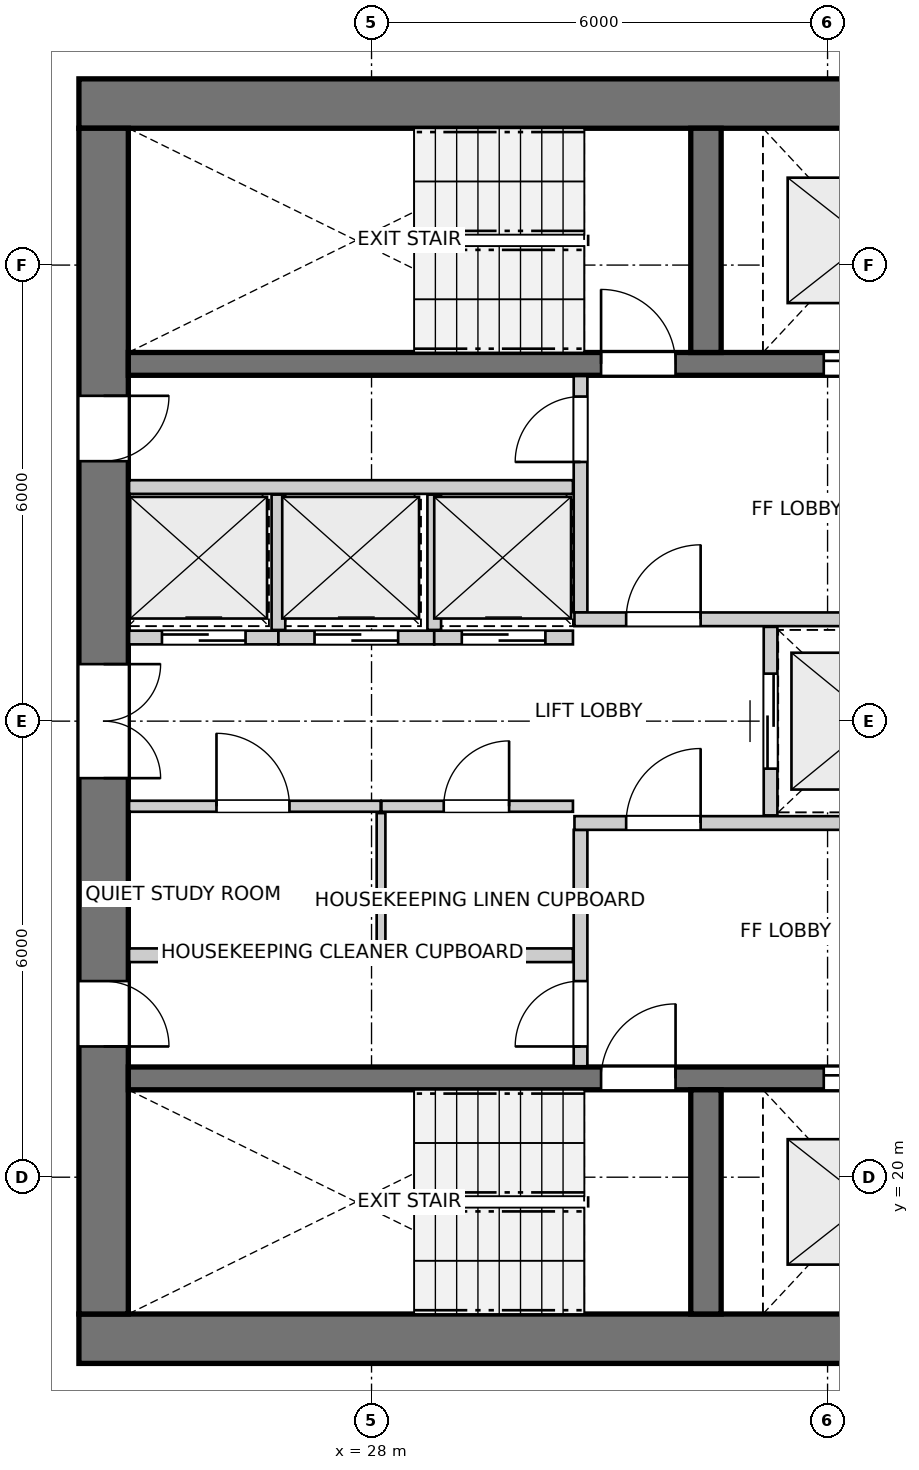
"""IFC4 building model, lengths in metres.
Left out: names, types, materials, properties, quantities, classifications, styles, units other than length and angle.
Written with IfcOpenShell. Run it as: python <this file> out.ifc"""

import sys

from ifc_helpers import new_model, si_unit, direction, frame, frame_2d, origin, place, context, subcontext, project, spatial, rectangle, extrude, source, transform, mapped, element, fill, save


model = new_model("IFC4")
c1 = context("Model", 3, precision=1e-05, world=origin(), true_north=direction((0.0, 1.0)))
c2 = subcontext(c1, "Body", "Model", "MODEL_VIEW")
j1 = project(units=[si_unit("LENGTHUNIT", "METRE"), si_unit("PLANEANGLEUNIT", "RADIAN")], contexts=[c1])
p1 = place(None, origin())
s1 = spatial("IfcSite", under=j1, at=p1, CompositionType="ELEMENT")
p2 = place(p1, origin())
s2 = spatial("IfcBuilding", under=s1, at=p2, CompositionType="ELEMENT")
p3 = place(p2, frame((0.0, 0.0, 161.8)))
s3 = spatial("IfcBuildingStorey", under=s2, at=p3, CompositionType="ELEMENT", Elevation=161.8)
for number, where, z_axis, x_axis in (
    (1, (24.15, 17.875, 0.0), (0.0, 0.0, 1.0), (1.0, 0.0, 0.0)),
    (2, (36.55, 34.125, 0.0), (0.0, 0.0, 1.0), (-1.0, 0.0, 0.0)),
):
    element("IfcWall", number, at=place(p3, frame(where, z_axis=z_axis, x_axis=x_axis)), inside=s3, PredefinedType="SHEAR", context=c2, shape_type="SweptSolid", body=[
        extrude(rectangle(XDim=12.4, YDim=0.65, at=frame_2d((6.2, 0.0))), origin(), (0.0, 0.0, 1.0), 2.95),
    ])
p4 = place(p3, frame((24.475, 33.8, 0.0), z_axis=(0.0, 0.0, 1.0), x_axis=(0.0, -1.0, 0.0)))
e3 = element("IfcWall", 3, at=p4, inside=s3, PredefinedType="SHEAR", context=c2, shape_type="SweptSolid", body=[
    extrude(rectangle(XDim=15.6, YDim=0.65, at=frame_2d((7.8, 0.0))), origin(), (0.0, 0.0, 1.0), 2.95),
])
p5 = place(p4, frame((7.05, 0.0, 0.0)))
e4 = element("IfcOpeningElement", 4, at=p5, cuts=e3, PredefinedType="OPENING", context=c2, shape_type="SweptSolid", body=[
    extrude(rectangle(XDim=1.5, YDim=2.15, at=frame_2d((0.75, 1.075))), frame((0.0, 0.335, 0.0), z_axis=(0.0, -1.0, 0.0), x_axis=(1.0, 0.0, 0.0)), (0.0, 0.0, 1.0), 0.67),
])
p6 = place(p4, frame((3.52, 0.0, 0.0)))
e5 = element("IfcOpeningElement", 5, at=p6, cuts=e3, PredefinedType="OPENING", context=c2, shape_type="SweptSolid", body=[
    extrude(rectangle(XDim=0.86, YDim=2.05, at=frame_2d((0.43, 1.025))), frame((0.0, 0.335, 0.0), z_axis=(0.0, -1.0, 0.0), x_axis=(1.0, 0.0, 0.0)), (0.0, 0.0, 1.0), 0.67),
])
p7 = place(p4, frame((11.22, 0.0, 0.0)))
e6 = element("IfcOpeningElement", 6, at=p7, cuts=e3, PredefinedType="OPENING", context=c2, shape_type="SweptSolid", body=[
    extrude(rectangle(XDim=0.86, YDim=2.05, at=frame_2d((0.43, 1.025))), frame((0.0, 0.335, 0.0), z_axis=(0.0, -1.0, 0.0), x_axis=(1.0, 0.0, 0.0)), (0.0, 0.0, 1.0), 0.67),
])
p8 = place(p3, frame((24.8, 21.3, 0.0), z_axis=(0.0, 0.0, 1.0), x_axis=(1.0, 0.0, 0.0)))
e7 = element("IfcWall", 7, at=p8, inside=s3, PredefinedType="SHEAR", context=c2, shape_type="SweptSolid", body=[
    extrude(rectangle(XDim=11.1, YDim=0.3, at=frame_2d((5.55, 0.0))), origin(), (0.0, 0.0, 1.0), 2.95),
])
p9 = place(p8, frame((6.22, 0.0, 0.0)))
e8 = element("IfcOpeningElement", 8, at=p9, cuts=e7, PredefinedType="OPENING", context=c2, shape_type="SweptSolid", body=[
    extrude(rectangle(XDim=0.98, YDim=2.15, at=frame_2d((0.49, 1.075))), frame((0.0, 0.16, 0.0), z_axis=(0.0, -1.0, 0.0), x_axis=(1.0, 0.0, 0.0)), (0.0, 0.0, 1.0), 0.32),
])
p10 = place(p8, frame((9.15, 0.0, 0.0)))
e9 = element("IfcOpeningElement", 9, at=p10, cuts=e7, PredefinedType="OPENING", context=c2, shape_type="SweptSolid", body=[
    extrude(rectangle(XDim=1.15, YDim=2.15, at=frame_2d((0.575, 1.075))), frame((0.0, 0.16, 0.0), z_axis=(0.0, -1.0, 0.0), x_axis=(1.0, 0.0, 0.0)), (0.0, 0.0, 1.0), 0.32),
])
p11 = place(p3, frame((32.4, 18.2, 0.0), z_axis=(0.0, 0.0, 1.0), x_axis=(0.0, 1.0, 0.0)))
e10 = element("IfcWall", 10, at=p11, inside=s3, PredefinedType="SHEAR", context=c2, shape_type="SweptSolid", body=[
    extrude(rectangle(XDim=2.95, YDim=0.4, at=frame_2d((1.475, 0.0))), origin(), (0.0, 0.0, 1.0), 2.95),
])
p12 = place(p3, frame((24.8, 30.7, 0.0), z_axis=(0.0, 0.0, 1.0), x_axis=(1.0, 0.0, 0.0)))
e11 = element("IfcWall", 11, at=p12, inside=s3, PredefinedType="SHEAR", context=c2, shape_type="SweptSolid", body=[
    extrude(rectangle(XDim=11.1, YDim=0.3, at=frame_2d((5.55, 0.0))), origin(), (0.0, 0.0, 1.0), 2.95),
])
p13 = place(p12, frame((6.22, 0.0, 0.0)))
e12 = element("IfcOpeningElement", 12, at=p13, cuts=e11, PredefinedType="OPENING", context=c2, shape_type="SweptSolid", body=[
    extrude(rectangle(XDim=0.98, YDim=2.15, at=frame_2d((0.49, 1.075))), frame((0.0, 0.16, 0.0), z_axis=(0.0, -1.0, 0.0), x_axis=(1.0, 0.0, 0.0)), (0.0, 0.0, 1.0), 0.32),
])
p14 = place(p12, frame((9.15, 0.0, 0.0)))
e13 = element("IfcOpeningElement", 13, at=p14, cuts=e11, PredefinedType="OPENING", context=c2, shape_type="SweptSolid", body=[
    extrude(rectangle(XDim=1.15, YDim=2.15, at=frame_2d((0.575, 1.075))), frame((0.0, 0.16, 0.0), z_axis=(0.0, -1.0, 0.0), x_axis=(1.0, 0.0, 0.0)), (0.0, 0.0, 1.0), 0.32),
])
p15 = place(p3, frame((32.4, 30.85, 0.0), z_axis=(0.0, 0.0, 1.0), x_axis=(0.0, 1.0, 0.0)))
e14 = element("IfcWall", 14, at=p15, inside=s3, PredefinedType="SHEAR", context=c2, shape_type="SweptSolid", body=[
    extrude(rectangle(XDim=2.95, YDim=0.4, at=frame_2d((1.475, 0.0))), origin(), (0.0, 0.0, 1.0), 2.95),
])
p16 = place(p3, frame((30.75, 21.46, 0.0), z_axis=(0.0, 0.0, 1.0), x_axis=(0.0, 1.0, 0.0)))
e15 = element("IfcWall", 15, at=p16, inside=s3, PredefinedType="PARTITIONING", context=c2, shape_type="SweptSolid", body=[
    extrude(rectangle(XDim=3.11, YDim=0.18, at=frame_2d((1.555, 0.0))), origin(), (0.0, 0.0, 1.0), 2.95),
])
p17 = place(p16, frame((0.26, 0.0, 0.0)))
e16 = element("IfcOpeningElement", 16, at=p17, cuts=e15, PredefinedType="OPENING", context=c2, shape_type="SweptSolid", body=[
    extrude(rectangle(XDim=0.86, YDim=2.05, at=frame_2d((0.43, 1.025))), frame((0.0, 0.1, 0.0), z_axis=(0.0, -1.0, 0.0), x_axis=(1.0, 0.0, 0.0)), (0.0, 0.0, 1.0), 0.2),
])
p18 = place(p3, frame((30.67, 24.66, 0.0), z_axis=(0.0, 0.0, 1.0), x_axis=(1.0, 0.0, 0.0)))
e17 = element("IfcWall", 17, at=p18, inside=s3, PredefinedType="PARTITIONING", context=c2, shape_type="SweptSolid", body=[
    extrude(rectangle(XDim=5.22, YDim=0.18, at=frame_2d((2.61, 0.0))), origin(), (0.0, 0.0, 1.0), 2.95),
])
p19 = place(p18, frame((0.68, 0.0, 0.0)))
e18 = element("IfcOpeningElement", 18, at=p19, cuts=e17, PredefinedType="OPENING", context=c2, shape_type="SweptSolid", body=[
    extrude(rectangle(XDim=0.98, YDim=2.15, at=frame_2d((0.49, 1.075))), frame((0.0, 0.1, 0.0), z_axis=(0.0, -1.0, 0.0), x_axis=(1.0, 0.0, 0.0)), (0.0, 0.0, 1.0), 0.2),
])
p20 = place(p3, frame((30.75, 27.43, 0.0), z_axis=(0.0, 0.0, 1.0), x_axis=(0.0, 1.0, 0.0)))
e19 = element("IfcWall", 19, at=p20, inside=s3, PredefinedType="PARTITIONING", context=c2, shape_type="SweptSolid", body=[
    extrude(rectangle(XDim=3.11, YDim=0.18, at=frame_2d((1.555, 0.0))), origin(), (0.0, 0.0, 1.0), 2.95),
])
p21 = place(p20, frame((1.98, 0.0, 0.0)))
e20 = element("IfcOpeningElement", 20, at=p21, cuts=e19, PredefinedType="OPENING", context=c2, shape_type="SweptSolid", body=[
    extrude(rectangle(XDim=0.86, YDim=2.05, at=frame_2d((0.43, 1.025))), frame((0.0, 0.1, 0.0), z_axis=(0.0, -1.0, 0.0), x_axis=(1.0, 0.0, 0.0)), (0.0, 0.0, 1.0), 0.2),
])
p22 = place(p3, frame((30.67, 27.34, 0.0), z_axis=(0.0, 0.0, 1.0), x_axis=(1.0, 0.0, 0.0)))
e21 = element("IfcWall", 21, at=p22, inside=s3, PredefinedType="PARTITIONING", context=c2, shape_type="SweptSolid", body=[
    extrude(rectangle(XDim=5.22, YDim=0.18, at=frame_2d((2.61, 0.0))), origin(), (0.0, 0.0, 1.0), 2.95),
])
p23 = place(p22, frame((0.68, 0.0, 0.0)))
e22 = element("IfcOpeningElement", 22, at=p23, cuts=e21, PredefinedType="OPENING", context=c2, shape_type="SweptSolid", body=[
    extrude(rectangle(XDim=0.98, YDim=2.15, at=frame_2d((0.49, 1.075))), frame((0.0, 0.1, 0.0), z_axis=(0.0, -1.0, 0.0), x_axis=(1.0, 0.0, 0.0)), (0.0, 0.0, 1.0), 0.2),
])
p24 = place(p3, frame((33.25, 24.76, 0.0), z_axis=(0.0, 0.0, 1.0), x_axis=(0.0, 1.0, 0.0)))
e23 = element("IfcWall", 23, at=p24, inside=s3, PredefinedType="PARTITIONING", context=c2, shape_type="SweptSolid", body=[
    extrude(rectangle(XDim=2.48, YDim=0.18, at=frame_2d((1.24, 0.0))), origin(), (0.0, 0.0, 1.0), 2.95),
])
p25 = place(p24, frame((0.615, 0.0, 0.0)))
e24 = element("IfcOpeningElement", 24, at=p25, cuts=e23, PredefinedType="OPENING", context=c2, shape_type="SweptSolid", body=[
    extrude(rectangle(XDim=1.25, YDim=2.15, at=frame_2d((0.625, 1.075))), frame((0.0, 0.1, 0.0), z_axis=(0.0, -1.0, 0.0), x_axis=(1.0, 0.0, 0.0)), (0.0, 0.0, 1.0), 0.2),
])
p26 = place(p3, frame((24.81, 22.92, 0.0), z_axis=(0.0, 0.0, 1.0), x_axis=(1.0, 0.0, 0.0)))
e25 = element("IfcWall", 25, at=p26, inside=s3, PredefinedType="PARTITIONING", context=c2, shape_type="SweptSolid", body=[
    extrude(rectangle(XDim=5.84, YDim=0.18, at=frame_2d((2.92, 0.0))), origin(), (0.0, 0.0, 1.0), 2.95),
])
p27 = place(p3, frame((24.81, 24.88, 0.0), z_axis=(0.0, 0.0, 1.0), x_axis=(1.0, 0.0, 0.0)))
e26 = element("IfcWall", 26, at=p27, inside=s3, PredefinedType="PARTITIONING", context=c2, shape_type="SweptSolid", body=[
    extrude(rectangle(XDim=3.31, YDim=0.145, at=frame_2d((1.655, 0.0))), origin(), (0.0, 0.0, 1.0), 2.95),
])
p28 = place(p27, frame((1.15, 0.0, 0.0)))
e27 = element("IfcOpeningElement", 27, at=p28, cuts=e26, PredefinedType="OPENING", context=c2, shape_type="SweptSolid", body=[
    extrude(rectangle(XDim=0.96, YDim=2.1, at=frame_2d((0.48, 1.05))), frame((0.0, 0.083, 0.0), z_axis=(0.0, -1.0, 0.0), x_axis=(1.0, 0.0, 0.0)), (0.0, 0.0, 1.0), 0.165),
])
p29 = place(p3, frame((28.13, 24.88, 0.0), z_axis=(0.0, 0.0, 1.0), x_axis=(1.0, 0.0, 0.0)))
e28 = element("IfcWall", 28, at=p29, inside=s3, PredefinedType="PARTITIONING", context=c2, shape_type="SweptSolid", body=[
    extrude(rectangle(XDim=2.52, YDim=0.145, at=frame_2d((1.26, 0.0))), origin(), (0.0, 0.0, 1.0), 2.95),
])
p30 = place(p29, frame((0.82, 0.0, 0.0)))
e29 = element("IfcOpeningElement", 29, at=p30, cuts=e28, PredefinedType="OPENING", context=c2, shape_type="SweptSolid", body=[
    extrude(rectangle(XDim=0.86, YDim=2.05, at=frame_2d((0.43, 1.025))), frame((0.0, 0.083, 0.0), z_axis=(0.0, -1.0, 0.0), x_axis=(1.0, 0.0, 0.0)), (0.0, 0.0, 1.0), 0.165),
])
p31 = place(p3, frame((28.125, 23.02, 0.0), z_axis=(0.0, 0.0, 1.0), x_axis=(0.0, 1.0, 0.0)))
e30 = element("IfcWall", 30, at=p31, inside=s3, PredefinedType="PARTITIONING", context=c2, shape_type="SweptSolid", body=[
    extrude(rectangle(XDim=1.77, YDim=0.115, at=frame_2d((0.885, 0.0))), origin(), (0.0, 0.0, 1.0), 2.95),
])
p32 = place(p3, frame((24.81, 29.08, 0.0), z_axis=(0.0, 0.0, 1.0), x_axis=(1.0, 0.0, 0.0)))
e31 = element("IfcWall", 31, at=p32, inside=s3, PredefinedType="PARTITIONING", context=c2, shape_type="SweptSolid", body=[
    extrude(rectangle(XDim=5.84, YDim=0.18, at=frame_2d((2.92, 0.0))), origin(), (0.0, 0.0, 1.0), 2.95),
])
p33 = place(p3, frame((24.81, 27.1, 0.0), z_axis=(0.0, 0.0, 1.0), x_axis=(1.0, 0.0, 0.0)))
e32 = element("IfcWall", 32, at=p33, inside=s3, PredefinedType="PARTITIONING", context=c2, shape_type="SweptSolid", body=[
    extrude(rectangle(XDim=1.965, YDim=0.18, at=frame_2d((0.982, 0.0))), origin(), (0.0, 0.0, 1.0), 2.95),
])
p34 = place(p33, frame((0.433, 0.0, 0.0)))
e33 = element("IfcOpeningElement", 33, at=p34, cuts=e32, PredefinedType="OPENING", context=c2, shape_type="SweptSolid", body=[
    extrude(rectangle(XDim=1.1, YDim=2.15, at=frame_2d((0.55, 1.075))), frame((0.0, 0.1, 0.0), z_axis=(0.0, -1.0, 0.0), x_axis=(1.0, 0.0, 0.0)), (0.0, 0.0, 1.0), 0.2),
])
p35 = place(p3, frame((26.775, 27.1, 0.0), z_axis=(0.0, 0.0, 1.0), x_axis=(1.0, 0.0, 0.0)))
e34 = element("IfcWall", 34, at=p35, inside=s3, PredefinedType="PARTITIONING", context=c2, shape_type="SweptSolid", body=[
    extrude(rectangle(XDim=2.05, YDim=0.18, at=frame_2d((1.025, 0.0))), origin(), (0.0, 0.0, 1.0), 2.95),
])
p36 = place(p35, frame((0.475, 0.0, 0.0)))
e35 = element("IfcOpeningElement", 35, at=p36, cuts=e34, PredefinedType="OPENING", context=c2, shape_type="SweptSolid", body=[
    extrude(rectangle(XDim=1.1, YDim=2.15, at=frame_2d((0.55, 1.075))), frame((0.0, 0.1, 0.0), z_axis=(0.0, -1.0, 0.0), x_axis=(1.0, 0.0, 0.0)), (0.0, 0.0, 1.0), 0.2),
])
p37 = place(p3, frame((26.775, 27.2, 0.0), z_axis=(0.0, 0.0, 1.0), x_axis=(0.0, 1.0, 0.0)))
e36 = element("IfcWall", 36, at=p37, inside=s3, PredefinedType="PARTITIONING", context=c2, shape_type="SweptSolid", body=[
    extrude(rectangle(XDim=1.78, YDim=0.18, at=frame_2d((0.89, 0.0))), origin(), (0.0, 0.0, 1.0), 2.95),
])
p38 = place(p3, frame((28.825, 27.1, 0.0), z_axis=(0.0, 0.0, 1.0), x_axis=(1.0, 0.0, 0.0)))
e37 = element("IfcWall", 37, at=p38, inside=s3, PredefinedType="PARTITIONING", context=c2, shape_type="SweptSolid", body=[
    extrude(rectangle(XDim=1.825, YDim=0.18, at=frame_2d((0.913, 0.0))), origin(), (0.0, 0.0, 1.0), 2.95),
])
p39 = place(p38, frame((0.363, 0.0, 0.0)))
e38 = element("IfcOpeningElement", 38, at=p39, cuts=e37, PredefinedType="OPENING", context=c2, shape_type="SweptSolid", body=[
    extrude(rectangle(XDim=1.1, YDim=2.15, at=frame_2d((0.55, 1.075))), frame((0.0, 0.1, 0.0), z_axis=(0.0, -1.0, 0.0), x_axis=(1.0, 0.0, 0.0)), (0.0, 0.0, 1.0), 0.2),
])
p40 = place(p3, frame((28.825, 27.2, 0.0), z_axis=(0.0, 0.0, 1.0), x_axis=(0.0, 1.0, 0.0)))
e39 = element("IfcWall", 39, at=p40, inside=s3, PredefinedType="PARTITIONING", context=c2, shape_type="SweptSolid", body=[
    extrude(rectangle(XDim=1.78, YDim=0.18, at=frame_2d((0.89, 0.0))), origin(), (0.0, 0.0, 1.0), 2.95),
])
m1 = source(origin(), c2, "Body", "SweptSolid", [
    extrude(rectangle(XDim=0.98, YDim=2.15, at=frame_2d((0.49, 1.075))), frame((0.0, 0.025, 0.0), z_axis=(0.0, -1.0, 0.0), x_axis=(1.0, 0.0, 0.0)), (0.0, 0.0, 1.0), 0.05),
])
p41 = place(p9, origin())
e40 = element("IfcDoor", 40, at=p41, inside=s3, OperationType="SINGLE_SWING_RIGHT", PredefinedType="DOOR", context=c2, shape_type="MappedRepresentation", body=[
    mapped(m1, transform((0.0, 0.0, 0.0), x_axis=(1.0, 0.0, 0.0), y_axis=(0.0, 1.0, 0.0), z_axis=(0.0, 0.0, 1.0), scale=1.0)),
])
fill(e8, e40)
m2 = source(origin(), c2, "Body", "SweptSolid", [
    extrude(rectangle(XDim=1.15, YDim=2.15, at=frame_2d((0.575, 1.075))), frame((0.0, 0.025, 0.0), z_axis=(0.0, -1.0, 0.0), x_axis=(1.0, 0.0, 0.0)), (0.0, 0.0, 1.0), 0.05),
])
p42 = place(p10, origin())
e41 = element("IfcDoor", 41, at=p42, inside=s3, OperationType="DOUBLE_DOOR_SLIDING", PredefinedType="DOOR", context=c2, shape_type="MappedRepresentation", body=[
    mapped(m2, transform((0.0, 0.0, 0.0), x_axis=(1.0, 0.0, 0.0), y_axis=(0.0, 1.0, 0.0), z_axis=(0.0, 0.0, 1.0), scale=1.0)),
])
fill(e9, e41)
p43 = place(p13, origin())
e42 = element("IfcDoor", 42, at=p43, inside=s3, OperationType="SINGLE_SWING_LEFT", PredefinedType="DOOR", context=c2, shape_type="MappedRepresentation", body=[
    mapped(m1, transform((0.0, 0.0, 0.0), x_axis=(1.0, 0.0, 0.0), y_axis=(0.0, 1.0, 0.0), z_axis=(0.0, 0.0, 1.0), scale=1.0)),
])
fill(e12, e42)
p44 = place(p14, origin())
e43 = element("IfcDoor", 43, at=p44, inside=s3, OperationType="DOUBLE_DOOR_SLIDING", PredefinedType="DOOR", context=c2, shape_type="MappedRepresentation", body=[
    mapped(m2, transform((0.0, 0.0, 0.0), x_axis=(1.0, 0.0, 0.0), y_axis=(0.0, 1.0, 0.0), z_axis=(0.0, 0.0, 1.0), scale=1.0)),
])
fill(e13, e43)
m3 = source(origin(), c2, "Body", "SweptSolid", [
    extrude(rectangle(XDim=1.5, YDim=2.15, at=frame_2d((0.75, 1.075))), frame((0.0, 0.025, 0.0), z_axis=(0.0, -1.0, 0.0), x_axis=(1.0, 0.0, 0.0)), (0.0, 0.0, 1.0), 0.05),
])
p45 = place(p5, origin())
e44 = element("IfcDoor", 44, at=p45, inside=s3, OperationType="DOUBLE_DOOR_SINGLE_SWING", PredefinedType="DOOR", context=c2, shape_type="MappedRepresentation", body=[
    mapped(m3, transform((0.0, 0.0, 0.0), x_axis=(1.0, 0.0, 0.0), y_axis=(0.0, 1.0, 0.0), z_axis=(0.0, 0.0, 1.0), scale=1.0)),
])
fill(e4, e44)
m4 = source(origin(), c2, "Body", "SweptSolid", [
    extrude(rectangle(XDim=0.86, YDim=2.05, at=frame_2d((0.43, 1.025))), frame((0.0, 0.025, 0.0), z_axis=(0.0, -1.0, 0.0), x_axis=(1.0, 0.0, 0.0)), (0.0, 0.0, 1.0), 0.05),
])
p46 = place(p6, origin())
e45 = element("IfcDoor", 45, at=p46, inside=s3, OperationType="SINGLE_SWING_LEFT", PredefinedType="DOOR", context=c2, shape_type="MappedRepresentation", body=[
    mapped(m4, transform((0.0, 0.0, 0.0), x_axis=(1.0, 0.0, 0.0), y_axis=(0.0, 1.0, 0.0), z_axis=(0.0, 0.0, 1.0), scale=1.0)),
])
fill(e5, e45)
p47 = place(p7, origin())
e46 = element("IfcDoor", 46, at=p47, inside=s3, OperationType="SINGLE_SWING_RIGHT", PredefinedType="DOOR", context=c2, shape_type="MappedRepresentation", body=[
    mapped(m4, transform((0.0, 0.0, 0.0), x_axis=(1.0, 0.0, 0.0), y_axis=(0.0, 1.0, 0.0), z_axis=(0.0, 0.0, 1.0), scale=1.0)),
])
fill(e6, e46)
p48 = place(p17, origin())
e47 = element("IfcDoor", 47, at=p48, inside=s3, OperationType="SINGLE_SWING_LEFT", PredefinedType="DOOR", context=c2, shape_type="MappedRepresentation", body=[
    mapped(m4, transform((0.0, 0.0, 0.0), x_axis=(1.0, 0.0, 0.0), y_axis=(0.0, 1.0, 0.0), z_axis=(0.0, 0.0, 1.0), scale=1.0)),
])
fill(e16, e47)
p49 = place(p19, origin())
e48 = element("IfcDoor", 48, at=p49, inside=s3, OperationType="SINGLE_SWING_RIGHT", PredefinedType="DOOR", context=c2, shape_type="MappedRepresentation", body=[
    mapped(m1, transform((0.0, 0.0, 0.0), x_axis=(1.0, 0.0, 0.0), y_axis=(0.0, 1.0, 0.0), z_axis=(0.0, 0.0, 1.0), scale=1.0)),
])
fill(e18, e48)
p50 = place(p21, origin())
e49 = element("IfcDoor", 49, at=p50, inside=s3, OperationType="SINGLE_SWING_LEFT", PredefinedType="DOOR", context=c2, shape_type="MappedRepresentation", body=[
    mapped(m4, transform((0.0, 0.0, 0.0), x_axis=(1.0, 0.0, 0.0), y_axis=(0.0, 1.0, 0.0), z_axis=(0.0, 0.0, 1.0), scale=1.0)),
])
fill(e20, e49)
p51 = place(p23, origin())
e50 = element("IfcDoor", 50, at=p51, inside=s3, OperationType="SINGLE_SWING_RIGHT", PredefinedType="DOOR", context=c2, shape_type="MappedRepresentation", body=[
    mapped(m1, transform((0.0, 0.0, 0.0), x_axis=(1.0, 0.0, 0.0), y_axis=(0.0, 1.0, 0.0), z_axis=(0.0, 0.0, 1.0), scale=1.0)),
])
fill(e22, e50)
m5 = source(origin(), c2, "Body", "SweptSolid", [
    extrude(rectangle(XDim=1.25, YDim=2.15, at=frame_2d((0.625, 1.075))), frame((0.0, 0.025, 0.0), z_axis=(0.0, -1.0, 0.0), x_axis=(1.0, 0.0, 0.0)), (0.0, 0.0, 1.0), 0.05),
])
p52 = place(p25, origin())
e51 = element("IfcDoor", 51, at=p52, inside=s3, OperationType="DOUBLE_DOOR_SLIDING", PredefinedType="DOOR", context=c2, shape_type="MappedRepresentation", body=[
    mapped(m5, transform((0.0, 0.0, 0.0), x_axis=(1.0, 0.0, 0.0), y_axis=(0.0, 1.0, 0.0), z_axis=(0.0, 0.0, 1.0), scale=1.0)),
])
fill(e24, e51)
m6 = source(origin(), c2, "Body", "SweptSolid", [
    extrude(rectangle(XDim=0.96, YDim=2.1, at=frame_2d((0.48, 1.05))), frame((0.0, 0.025, 0.0), z_axis=(0.0, -1.0, 0.0), x_axis=(1.0, 0.0, 0.0)), (0.0, 0.0, 1.0), 0.05),
])
p53 = place(p28, origin())
e52 = element("IfcDoor", 52, at=p53, inside=s3, OperationType="SINGLE_SWING_LEFT", PredefinedType="DOOR", context=c2, shape_type="MappedRepresentation", body=[
    mapped(m6, transform((0.0, 0.0, 0.0), x_axis=(1.0, 0.0, 0.0), y_axis=(0.0, 1.0, 0.0), z_axis=(0.0, 0.0, 1.0), scale=1.0)),
])
fill(e27, e52)
p54 = place(p30, origin())
e53 = element("IfcDoor", 53, at=p54, inside=s3, OperationType="SINGLE_SWING_RIGHT", PredefinedType="DOOR", context=c2, shape_type="MappedRepresentation", body=[
    mapped(m4, transform((0.0, 0.0, 0.0), x_axis=(1.0, 0.0, 0.0), y_axis=(0.0, 1.0, 0.0), z_axis=(0.0, 0.0, 1.0), scale=1.0)),
])
fill(e29, e53)
m7 = source(origin(), c2, "Body", "SweptSolid", [
    extrude(rectangle(XDim=1.1, YDim=2.15, at=frame_2d((0.55, 1.075))), frame((0.0, 0.025, 0.0), z_axis=(0.0, -1.0, 0.0), x_axis=(1.0, 0.0, 0.0)), (0.0, 0.0, 1.0), 0.05),
])
p55 = place(p34, origin())
e54 = element("IfcDoor", 54, at=p55, inside=s3, OperationType="DOUBLE_DOOR_SLIDING", PredefinedType="DOOR", context=c2, shape_type="MappedRepresentation", body=[
    mapped(m7, transform((0.0, 0.0, 0.0), x_axis=(1.0, 0.0, 0.0), y_axis=(0.0, 1.0, 0.0), z_axis=(0.0, 0.0, 1.0), scale=1.0)),
])
fill(e33, e54)
p56 = place(p36, origin())
e55 = element("IfcDoor", 55, at=p56, inside=s3, OperationType="DOUBLE_DOOR_SLIDING", PredefinedType="DOOR", context=c2, shape_type="MappedRepresentation", body=[
    mapped(m7, transform((0.0, 0.0, 0.0), x_axis=(1.0, 0.0, 0.0), y_axis=(0.0, 1.0, 0.0), z_axis=(0.0, 0.0, 1.0), scale=1.0)),
])
fill(e35, e55)
p57 = place(p39, origin())
e56 = element("IfcDoor", 56, at=p57, inside=s3, OperationType="DOUBLE_DOOR_SLIDING", PredefinedType="DOOR", context=c2, shape_type="MappedRepresentation", body=[
    mapped(m7, transform((0.0, 0.0, 0.0), x_axis=(1.0, 0.0, 0.0), y_axis=(0.0, 1.0, 0.0), z_axis=(0.0, 0.0, 1.0), scale=1.0)),
])
fill(e38, e56)
save(model, sys.argv[1])
